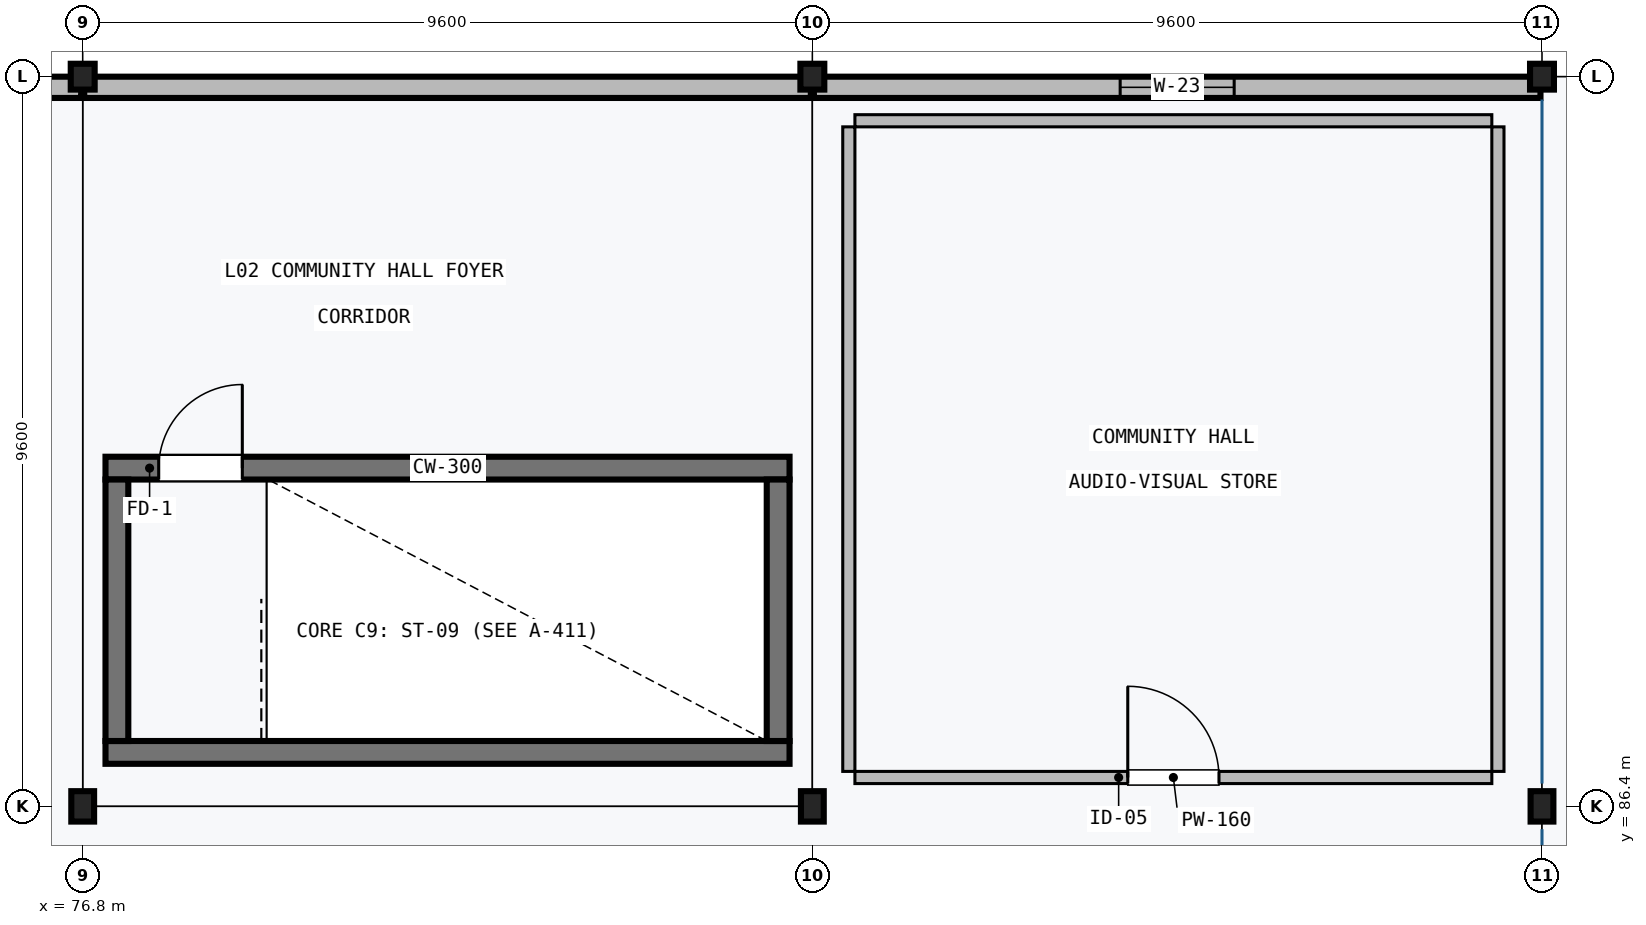
"""IFC4 building model, lengths in metres.
Left out: names, types, materials, properties, quantities, classifications, styles, units other than length and angle.
Written with IfcOpenShell. Run it as: python <this file> out.ifc"""

import sys

from ifc_helpers import new_model, si_unit, direction, frame, frame_2d, origin, origin_2d, place, context, subcontext, project, spatial, rectangle, i_section, extrude, element, fill, save


model = new_model("IFC4")
c1 = context("Model", 3, precision=1e-05, world=origin(), true_north=direction((0.0, 1.0)))
c2 = subcontext(c1, "Body", "Model", "MODEL_VIEW")
j1 = project(units=[si_unit("LENGTHUNIT", "METRE"), si_unit("PLANEANGLEUNIT", "RADIAN")], contexts=[c1])
p1 = place(None, origin())
s1 = spatial("IfcSite", under=j1, at=p1, CompositionType="ELEMENT")
p2 = place(p1, origin())
s2 = spatial("IfcBuilding", under=s1, at=p2, CompositionType="ELEMENT")
p3 = place(p2, frame((0.0, 0.0, 10.5)))
s3 = spatial("IfcBuildingStorey", under=s2, at=p3, CompositionType="ELEMENT", Elevation=10.5)
p4 = place(p3, frame((76.8, 86.4, 0.0), z_axis=(0.0, 0.0, 1.0), x_axis=(1.0, 0.0, 0.0)))
e1 = element("IfcColumn", 1, at=p4, inside=s3, PredefinedType="COLUMN", context=c2, shape_type="SweptSolid", body=[
    extrude(i_section(OverallWidth=0.3, OverallDepth=0.4, WebThickness=0.013, FlangeThickness=0.024, FilletRadius=0.027, at=origin_2d()), origin(), (0.0, 0.0, 1.0), 3.95),
])
p5 = place(p3, frame((76.8, 96.0, 0.0), z_axis=(0.0, 0.0, 1.0), x_axis=(1.0, 0.0, 0.0)))
e2 = element("IfcColumn", 2, at=p5, inside=s3, PredefinedType="COLUMN", context=c2, shape_type="SweptSolid", body=[
    extrude(i_section(OverallWidth=0.314, OverallDepth=0.34, WebThickness=0.019, FlangeThickness=0.031, FilletRadius=0.015, at=origin_2d()), origin(), (0.0, 0.0, 1.0), 3.95),
])
p6 = place(p3, frame((86.4, 86.4, 0.0), z_axis=(0.0, 0.0, 1.0), x_axis=(1.0, 0.0, 0.0)))
e3 = element("IfcColumn", 3, at=p6, inside=s3, PredefinedType="COLUMN", context=c2, shape_type="SweptSolid", body=[
    extrude(i_section(OverallWidth=0.3, OverallDepth=0.4, WebThickness=0.013, FlangeThickness=0.024, FilletRadius=0.027, at=origin_2d()), origin(), (0.0, 0.0, 1.0), 3.95),
])
p7 = place(p3, frame((86.4, 96.0, 0.0), z_axis=(0.0, 0.0, 1.0), x_axis=(1.0, 0.0, 0.0)))
e4 = element("IfcColumn", 4, at=p7, inside=s3, PredefinedType="COLUMN", context=c2, shape_type="SweptSolid", body=[
    extrude(i_section(OverallWidth=0.314, OverallDepth=0.34, WebThickness=0.019, FlangeThickness=0.031, FilletRadius=0.015, at=origin_2d()), origin(), (0.0, 0.0, 1.0), 3.95),
])
p8 = place(p3, frame((96.0, 86.4, 0.0), z_axis=(0.0, 0.0, 1.0), x_axis=(1.0, 0.0, 0.0)))
e5 = element("IfcColumn", 5, at=p8, inside=s3, PredefinedType="COLUMN", context=c2, shape_type="SweptSolid", body=[
    extrude(i_section(OverallWidth=0.3, OverallDepth=0.4, WebThickness=0.013, FlangeThickness=0.024, FilletRadius=0.027, at=origin_2d()), origin(), (0.0, 0.0, 1.0), 3.95),
])
p9 = place(p3, frame((96.0, 96.0, 0.0), z_axis=(0.0, 0.0, 1.0), x_axis=(1.0, 0.0, 0.0)))
e6 = element("IfcColumn", 6, at=p9, inside=s3, PredefinedType="COLUMN", context=c2, shape_type="SweptSolid", body=[
    extrude(i_section(OverallWidth=0.314, OverallDepth=0.34, WebThickness=0.019, FlangeThickness=0.031, FilletRadius=0.015, at=origin_2d()), origin(), (0.0, 0.0, 1.0), 3.95),
])
p10 = place(p3, frame((77.1, 87.11, 0.0), z_axis=(0.0, 0.0, 1.0), x_axis=(1.0, 0.0, 0.0)))
e7 = element("IfcWall", 7, at=p10, inside=s3, PredefinedType="SHEAR", context=c2, shape_type="SweptSolid", body=[
    extrude(rectangle(XDim=9.0, YDim=0.3, at=frame_2d((4.5, 0.0))), origin(), (0.0, 0.0, 1.0), 3.95),
])
p11 = place(p3, frame((86.1, 90.85, 0.0), z_axis=(0.0, 0.0, 1.0), x_axis=(-1.0, 0.0, 0.0)))
e8 = element("IfcWall", 8, at=p11, inside=s3, PredefinedType="SHEAR", context=c2, shape_type="SweptSolid", body=[
    extrude(rectangle(XDim=9.0, YDim=0.3, at=frame_2d((4.5, 0.0))), origin(), (0.0, 0.0, 1.0), 3.95),
])
p12 = place(p11, frame((7.2, 0.0, 0.0)))
e9 = element("IfcOpeningElement", 9, at=p12, cuts=e8, PredefinedType="OPENING", context=c2, shape_type="SweptSolid", body=[
    extrude(rectangle(XDim=1.1, YDim=2.15, at=frame_2d((0.55, 1.075))), frame((0.0, 0.16, 0.0), z_axis=(0.0, -1.0, 0.0), x_axis=(1.0, 0.0, 0.0)), (0.0, 0.0, 1.0), 0.32),
])
for number, where, z_axis, x_axis in (
    (10, (77.25, 87.26, 0.0), (0.0, 0.0, 1.0), (0.0, 1.0, 0.0)),
    (11, (85.95, 90.7, 0.0), (0.0, 0.0, 1.0), (0.0, -1.0, 0.0)),
):
    element("IfcWall", number, at=place(p3, frame(where, z_axis=z_axis, x_axis=x_axis)), inside=s3, PredefinedType="SHEAR", context=c2, shape_type="SweptSolid", body=[
        extrude(rectangle(XDim=3.44, YDim=0.3, at=frame_2d((1.72, 0.0))), origin(), (0.0, 0.0, 1.0), 3.95),
    ])
p13 = place(p3, frame((67.22, 95.86, 0.0), z_axis=(0.0, 0.0, 1.0), x_axis=(1.0, 0.0, 0.0)))
e12 = element("IfcWall", 12, at=p13, inside=s3, PredefinedType="SOLIDWALL", context=c2, shape_type="SweptSolid", body=[
    extrude(rectangle(XDim=9.56, YDim=0.28, at=frame_2d((4.78, 0.0))), origin(), (0.0, 0.0, 1.0), 3.66),
])
p14 = place(p13, frame((3.805, 0.0, 0.9)))
e13 = element("IfcOpeningElement", 13, at=p14, cuts=e12, PredefinedType="OPENING", context=c2, shape_type="SweptSolid", body=[
    extrude(rectangle(XDim=1.95, YDim=1.8, at=frame_2d((0.975, 0.9))), frame((0.0, 0.15, 0.0), z_axis=(0.0, -1.0, 0.0), x_axis=(1.0, 0.0, 0.0)), (0.0, 0.0, 1.0), 0.3),
])
p15 = place(p3, frame((76.82, 95.86, 0.0), z_axis=(0.0, 0.0, 1.0), x_axis=(1.0, 0.0, 0.0)))
e14 = element("IfcWall", 14, at=p15, inside=s3, PredefinedType="SOLIDWALL", context=c2, shape_type="SweptSolid", body=[
    extrude(rectangle(XDim=9.56, YDim=0.28, at=frame_2d((4.78, 0.0))), origin(), (0.0, 0.0, 1.0), 3.66),
])
p16 = place(p3, frame((86.42, 95.86, 0.0), z_axis=(0.0, 0.0, 1.0), x_axis=(1.0, 0.0, 0.0)))
e15 = element("IfcWall", 15, at=p16, inside=s3, PredefinedType="SOLIDWALL", context=c2, shape_type="SweptSolid", body=[
    extrude(rectangle(XDim=9.56, YDim=0.28, at=frame_2d((4.78, 0.0))), origin(), (0.0, 0.0, 1.0), 3.66),
])
p17 = place(p16, frame((4.03, 0.0, 0.9)))
e16 = element("IfcOpeningElement", 16, at=p17, cuts=e15, PredefinedType="OPENING", context=c2, shape_type="SweptSolid", body=[
    extrude(rectangle(XDim=1.5, YDim=2.1, at=frame_2d((0.75, 1.05))), frame((0.0, 0.15, 0.0), z_axis=(0.0, -1.0, 0.0), x_axis=(1.0, 0.0, 0.0)), (0.0, 0.0, 1.0), 0.3),
])
p18 = place(p3, frame((95.34, 86.78, 0.0), z_axis=(0.0, 0.0, 1.0), x_axis=(-1.0, 0.0, 0.0)))
e17 = element("IfcWall", 17, at=p18, inside=s3, PredefinedType="PARTITIONING", context=c2, shape_type="SweptSolid", body=[
    extrude(rectangle(XDim=8.38, YDim=0.16, at=frame_2d((4.19, 0.0))), origin(), (0.0, 0.0, 1.0), 3.59),
])
p19 = place(p18, frame((3.59, 0.0, 0.0)))
e18 = element("IfcOpeningElement", 18, at=p19, cuts=e17, PredefinedType="OPENING", context=c2, shape_type="SweptSolid", body=[
    extrude(rectangle(XDim=1.2, YDim=2.2, at=frame_2d((0.6, 1.1))), frame((0.0, 0.09, 0.0), z_axis=(0.0, -1.0, 0.0), x_axis=(1.0, 0.0, 0.0)), (0.0, 0.0, 1.0), 0.18),
])
p20 = place(p3, frame((86.96, 95.42, 0.0), z_axis=(0.0, 0.0, 1.0), x_axis=(1.0, 0.0, 0.0)))
e19 = element("IfcWall", 19, at=p20, inside=s3, PredefinedType="PARTITIONING", context=c2, shape_type="SweptSolid", body=[
    extrude(rectangle(XDim=8.38, YDim=0.16, at=frame_2d((4.19, 0.0))), origin(), (0.0, 0.0, 1.0), 3.59),
])
for number, where, z_axis, x_axis in (
    (20, (86.88, 86.86, 0.0), (0.0, 0.0, 1.0), (0.0, 1.0, 0.0)),
    (21, (95.42, 95.34, 0.0), (0.0, 0.0, 1.0), (0.0, -1.0, 0.0)),
):
    element("IfcWall", number, at=place(p3, frame(where, z_axis=z_axis, x_axis=x_axis)), inside=s3, PredefinedType="PARTITIONING", context=c2, shape_type="SweptSolid", body=[
        extrude(rectangle(XDim=8.48, YDim=0.16, at=frame_2d((4.24, 0.0))), origin(), (0.0, 0.0, 1.0), 3.59),
    ])
p21 = place(p12, frame((1.1, 0.0, 0.0), z_axis=(0.0, 0.0, 1.0), x_axis=(-1.0, 0.0, 0.0)))
e22 = element("IfcDoor", 22, at=p21, inside=s3, OperationType="SINGLE_SWING_LEFT", PredefinedType="DOOR", context=c2, shape_type="SweptSolid", body=[
    extrude(rectangle(XDim=1.1, YDim=2.15, at=frame_2d((0.55, 1.075))), frame((0.0, 0.025, 0.0), z_axis=(0.0, -1.0, 0.0), x_axis=(1.0, 0.0, 0.0)), (0.0, 0.0, 1.0), 0.05),
])
fill(e9, e22)
p22 = place(p17, origin())
e23 = element("IfcWindow", 23, at=p22, inside=s3, PartitioningType="SINGLE_PANEL", PredefinedType="WINDOW", context=c2, shape_type="SweptSolid", body=[
    extrude(rectangle(XDim=1.5, YDim=2.1, at=frame_2d((0.75, 1.05))), frame((0.0, 0.03, 0.0), z_axis=(0.0, -1.0, 0.0), x_axis=(1.0, 0.0, 0.0)), (0.0, 0.0, 1.0), 0.06),
])
fill(e16, e23)
p23 = place(p19, frame((1.2, 0.0, 0.0), z_axis=(0.0, 0.0, 1.0), x_axis=(-1.0, 0.0, 0.0)))
e24 = element("IfcDoor", 24, at=p23, inside=s3, OperationType="SINGLE_SWING_RIGHT", PredefinedType="DOOR", context=c2, shape_type="SweptSolid", body=[
    extrude(rectangle(XDim=1.2, YDim=2.2, at=frame_2d((0.6, 1.1))), frame((0.0, 0.025, 0.0), z_axis=(0.0, -1.0, 0.0), x_axis=(1.0, 0.0, 0.0)), (0.0, 0.0, 1.0), 0.05),
])
fill(e18, e24)
save(model, sys.argv[1])
